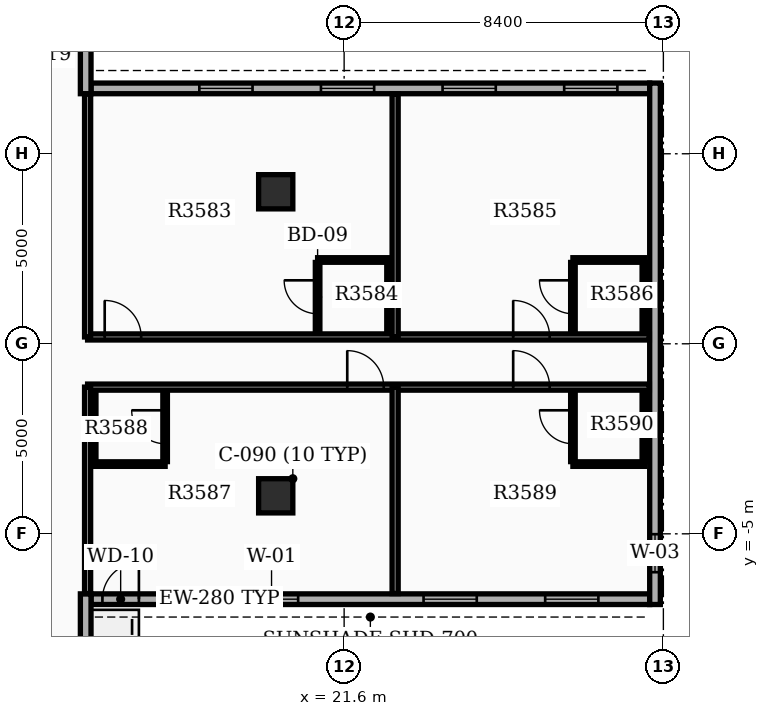
"""IFC4 building model, lengths in metres.
Left out: names, types, materials, properties, quantities, classifications, styles, units other than length and angle.
Written with IfcOpenShell. Run it as: python <this file> out.ifc"""

import sys

from ifc_helpers import new_model, si_unit, direction, frame, frame_2d, origin, origin_2d, place, context, subcontext, project, spatial, rectangle, extrude, element, fill, save


model = new_model("IFC4")
c1 = context("Model", 3, precision=1e-05, world=origin(), true_north=direction((0.0, 1.0)))
c2 = subcontext(c1, "Body", "Model", "MODEL_VIEW")
j1 = project(units=[si_unit("LENGTHUNIT", "METRE"), si_unit("PLANEANGLEUNIT", "RADIAN")], contexts=[c1])
p1 = place(None, origin())
s1 = spatial("IfcSite", under=j1, at=p1, CompositionType="ELEMENT")
p2 = place(p1, origin())
s2 = spatial("IfcBuilding", under=s1, at=p2, CompositionType="ELEMENT")
p3 = place(p2, frame((0.0, 0.0, 224.7)))
s3 = spatial("IfcBuildingStorey", under=s2, at=p3, CompositionType="ELEMENT", Elevation=224.7)
for number, where, z_axis, x_axis in (
    (1, (19.8, -4.0, 0.0), (0.0, 0.0, 1.0), (1.0, 0.0, 0.0)),
    (2, (19.8, 4.0, 0.0), (0.0, 0.0, 1.0), (1.0, 0.0, 0.0)),
):
    element("IfcColumn", number, at=place(p3, frame(where, z_axis=z_axis, x_axis=x_axis)), inside=s3, PredefinedType="COLUMN", context=c2, shape_type="SweptSolid", body=[
        extrude(rectangle(XDim=0.9, YDim=0.9, at=origin_2d()), origin(), (0.0, 0.0, 1.0), 3.9),
    ])
p4 = place(p3, frame((14.94, -6.72, 0.0), z_axis=(0.0, 0.0, 1.0), x_axis=(1.0, 0.0, 0.0)))
e3 = element("IfcWall", 3, at=p4, inside=s3, PredefinedType="STANDARD", context=c2, shape_type="SweptSolid", body=[
    extrude(rectangle(XDim=14.7, YDim=0.28, at=frame_2d((7.35, 0.0))), origin(), (0.0, 0.0, 1.0), 3.18),
])
p5 = place(p4, frame((4.05, 0.0, 0.8)))
e4 = element("IfcOpeningElement", 4, at=p5, cuts=e3, PredefinedType="OPENING", context=c2, shape_type="SweptSolid", body=[
    extrude(rectangle(XDim=1.4, YDim=1.6, at=frame_2d((0.7, 0.8))), frame((0.0, 0.15, 0.0), z_axis=(0.0, -1.0, 0.0), x_axis=(1.0, 0.0, 0.0)), (0.0, 0.0, 1.0), 0.3),
])
p6 = place(p4, frame((8.75, 0.0, 0.8)))
e5 = element("IfcOpeningElement", 5, at=p6, cuts=e3, PredefinedType="OPENING", context=c2, shape_type="SweptSolid", body=[
    extrude(rectangle(XDim=1.4, YDim=1.6, at=frame_2d((0.7, 0.8))), frame((0.0, 0.15, 0.0), z_axis=(0.0, -1.0, 0.0), x_axis=(1.0, 0.0, 0.0)), (0.0, 0.0, 1.0), 0.3),
])
p7 = place(p4, frame((11.95, 0.0, 0.8)))
e6 = element("IfcOpeningElement", 6, at=p7, cuts=e3, PredefinedType="OPENING", context=c2, shape_type="SweptSolid", body=[
    extrude(rectangle(XDim=1.4, YDim=1.6, at=frame_2d((0.7, 0.8))), frame((0.0, 0.15, 0.0), z_axis=(0.0, -1.0, 0.0), x_axis=(1.0, 0.0, 0.0)), (0.0, 0.0, 1.0), 0.3),
])
p8 = place(p4, frame((0.3, 0.0, 0.0)))
e7 = element("IfcOpeningElement", 7, at=p8, cuts=e3, PredefinedType="OPENING", context=c2, shape_type="SweptSolid", body=[
    extrude(rectangle(XDim=0.96, YDim=2.1, at=frame_2d((0.48, 1.05))), frame((0.0, 0.15, 0.0), z_axis=(0.0, -1.0, 0.0), x_axis=(1.0, 0.0, 0.0)), (0.0, 0.0, 1.0), 0.3),
])
p9 = place(p3, frame((29.64, 6.72, 0.0), z_axis=(0.0, 0.0, 1.0), x_axis=(-1.0, 0.0, 0.0)))
e8 = element("IfcWall", 8, at=p9, inside=s3, PredefinedType="STANDARD", context=c2, shape_type="SweptSolid", body=[
    extrude(rectangle(XDim=14.7, YDim=0.28, at=frame_2d((7.35, 0.0))), origin(), (0.0, 0.0, 1.0), 3.18),
])
p10 = place(p9, frame((0.85, 0.0, 0.8)))
e9 = element("IfcOpeningElement", 9, at=p10, cuts=e8, PredefinedType="OPENING", context=c2, shape_type="SweptSolid", body=[
    extrude(rectangle(XDim=1.4, YDim=1.6, at=frame_2d((0.7, 0.8))), frame((0.0, 0.15, 0.0), z_axis=(0.0, -1.0, 0.0), x_axis=(1.0, 0.0, 0.0)), (0.0, 0.0, 1.0), 0.3),
])
p11 = place(p9, frame((4.05, 0.0, 0.8)))
e10 = element("IfcOpeningElement", 10, at=p11, cuts=e8, PredefinedType="OPENING", context=c2, shape_type="SweptSolid", body=[
    extrude(rectangle(XDim=1.4, YDim=1.6, at=frame_2d((0.7, 0.8))), frame((0.0, 0.15, 0.0), z_axis=(0.0, -1.0, 0.0), x_axis=(1.0, 0.0, 0.0)), (0.0, 0.0, 1.0), 0.3),
])
p12 = place(p9, frame((7.25, 0.0, 0.8)))
e11 = element("IfcOpeningElement", 11, at=p12, cuts=e8, PredefinedType="OPENING", context=c2, shape_type="SweptSolid", body=[
    extrude(rectangle(XDim=1.4, YDim=1.6, at=frame_2d((0.7, 0.8))), frame((0.0, 0.15, 0.0), z_axis=(0.0, -1.0, 0.0), x_axis=(1.0, 0.0, 0.0)), (0.0, 0.0, 1.0), 0.3),
])
p13 = place(p9, frame((10.45, 0.0, 0.8)))
e12 = element("IfcOpeningElement", 12, at=p13, cuts=e8, PredefinedType="OPENING", context=c2, shape_type="SweptSolid", body=[
    extrude(rectangle(XDim=1.4, YDim=1.6, at=frame_2d((0.7, 0.8))), frame((0.0, 0.15, 0.0), z_axis=(0.0, -1.0, 0.0), x_axis=(1.0, 0.0, 0.0)), (0.0, 0.0, 1.0), 0.3),
])
p14 = place(p3, frame((29.78, -6.86, 0.0), z_axis=(0.0, 0.0, 1.0), x_axis=(0.0, 1.0, 0.0)))
e13 = element("IfcWall", 13, at=p14, inside=s3, PredefinedType="STANDARD", context=c2, shape_type="SweptSolid", body=[
    extrude(rectangle(XDim=13.72, YDim=0.28, at=frame_2d((6.86, 0.0))), origin(), (0.0, 0.0, 1.0), 3.18),
])
p15 = place(p14, frame((0.85, 0.0, 0.85)))
e14 = element("IfcOpeningElement", 14, at=p15, cuts=e13, PredefinedType="OPENING", context=c2, shape_type="SweptSolid", body=[
    extrude(rectangle(XDim=1.0, YDim=1.5, at=frame_2d((0.5, 0.75))), frame((0.0, 0.15, 0.0), z_axis=(0.0, -1.0, 0.0), x_axis=(1.0, 0.0, 0.0)), (0.0, 0.0, 1.0), 0.3),
])
for number, where, z_axis, x_axis in (
    (15, (14.8, 6.58, 0.0), (0.0, 0.0, 1.0), (0.0, 1.0, 0.0)),
    (16, (14.8, -6.58, 0.0), (0.0, 0.0, 1.0), (0.0, -1.0, 0.0)),
):
    element("IfcWall", number, at=place(p3, frame(where, z_axis=z_axis, x_axis=x_axis)), inside=s3, PredefinedType="STANDARD", context=c2, shape_type="SweptSolid", body=[
        extrude(rectangle(XDim=6.86, YDim=0.28, at=frame_2d((3.43, 0.0))), origin(), (0.0, 0.0, 1.0), 3.18),
    ])
p16 = place(p3, frame((14.85, 0.18, 0.0), z_axis=(0.0, 0.0, 1.0), x_axis=(1.0, 0.0, 0.0)))
e17 = element("IfcWall", 17, at=p16, inside=s3, PredefinedType="PARTITIONING", context=c2, shape_type="SweptSolid", body=[
    extrude(rectangle(XDim=14.782, YDim=0.16, at=frame_2d((7.391, 0.0))), origin(), (0.0, 0.0, 1.0), 3.17),
])
p17 = place(p16, frame((0.45, 0.0, 0.0)))
e18 = element("IfcOpeningElement", 18, at=p17, cuts=e17, PredefinedType="OPENING", context=c2, shape_type="SweptSolid", body=[
    extrude(rectangle(XDim=0.96, YDim=2.15, at=frame_2d((0.48, 1.075))), frame((0.0, 0.09, 0.0), z_axis=(0.0, -1.0, 0.0), x_axis=(1.0, 0.0, 0.0)), (0.0, 0.0, 1.0), 0.18),
])
p18 = place(p16, frame((11.198, 0.0, 0.0)))
e19 = element("IfcOpeningElement", 19, at=p18, cuts=e17, PredefinedType="OPENING", context=c2, shape_type="SweptSolid", body=[
    extrude(rectangle(XDim=0.96, YDim=2.15, at=frame_2d((0.48, 1.075))), frame((0.0, 0.09, 0.0), z_axis=(0.0, -1.0, 0.0), x_axis=(1.0, 0.0, 0.0)), (0.0, 0.0, 1.0), 0.18),
])
for number, where, z_axis, x_axis in (
    (20, (14.85, 0.18, 0.0), (0.0, 0.0, 1.0), (0.0, 1.0, 0.0)),
    (21, (22.942, 0.18, 0.0), (0.0, 0.0, 1.0), (0.0, 1.0, 0.0)),
):
    element("IfcWall", number, at=place(p3, frame(where, z_axis=z_axis, x_axis=x_axis)), inside=s3, PredefinedType="PARTITIONING", context=c2, shape_type="SweptSolid", body=[
        extrude(rectangle(XDim=6.392, YDim=0.16, at=frame_2d((3.196, 0.0))), origin(), (0.0, 0.0, 1.0), 3.17),
    ])
p19 = place(p3, frame((20.902, 0.32, 0.0), z_axis=(0.0, 0.0, 1.0), x_axis=(0.0, 1.0, 0.0)))
e22 = element("IfcWall", 22, at=p19, inside=s3, PredefinedType="PARTITIONING", context=c2, shape_type="SweptSolid", body=[
    extrude(rectangle(XDim=1.82, YDim=0.12, at=frame_2d((0.91, 0.0))), origin(), (0.0, 0.0, 1.0), 3.17),
])
p20 = place(p19, frame((0.47, 0.0, 0.0)))
e23 = element("IfcOpeningElement", 23, at=p20, cuts=e22, PredefinedType="OPENING", context=c2, shape_type="SweptSolid", body=[
    extrude(rectangle(XDim=0.88, YDim=2.1, at=frame_2d((0.44, 1.05))), frame((0.0, 0.07, 0.0), z_axis=(0.0, -1.0, 0.0), x_axis=(1.0, 0.0, 0.0)), (0.0, 0.0, 1.0), 0.14),
])
p21 = place(p3, frame((22.782, 0.32, 0.0), z_axis=(0.0, 0.0, 1.0), x_axis=(0.0, 1.0, 0.0)))
e24 = element("IfcWall", 24, at=p21, inside=s3, PredefinedType="PARTITIONING", context=c2, shape_type="SweptSolid", body=[
    extrude(rectangle(XDim=1.82, YDim=0.12, at=frame_2d((0.91, 0.0))), origin(), (0.0, 0.0, 1.0), 3.17),
])
p22 = place(p3, frame((20.902, 2.205, 0.0), z_axis=(0.0, 0.0, 1.0), x_axis=(1.0, 0.0, 0.0)))
e25 = element("IfcWall", 25, at=p22, inside=s3, PredefinedType="PARTITIONING", context=c2, shape_type="SweptSolid", body=[
    extrude(rectangle(XDim=1.88, YDim=0.12, at=frame_2d((0.94, 0.0))), origin(), (0.0, 0.0, 1.0), 3.17),
])
p23 = place(p3, frame((27.62, 0.32, 0.0), z_axis=(0.0, 0.0, 1.0), x_axis=(0.0, 1.0, 0.0)))
e26 = element("IfcWall", 26, at=p23, inside=s3, PredefinedType="PARTITIONING", context=c2, shape_type="SweptSolid", body=[
    extrude(rectangle(XDim=1.82, YDim=0.12, at=frame_2d((0.91, 0.0))), origin(), (0.0, 0.0, 1.0), 3.17),
])
p24 = place(p23, frame((0.47, 0.0, 0.0)))
e27 = element("IfcOpeningElement", 27, at=p24, cuts=e26, PredefinedType="OPENING", context=c2, shape_type="SweptSolid", body=[
    extrude(rectangle(XDim=0.88, YDim=2.1, at=frame_2d((0.44, 1.05))), frame((0.0, 0.07, 0.0), z_axis=(0.0, -1.0, 0.0), x_axis=(1.0, 0.0, 0.0)), (0.0, 0.0, 1.0), 0.14),
])
p25 = place(p3, frame((29.5, 0.32, 0.0), z_axis=(0.0, 0.0, 1.0), x_axis=(0.0, 1.0, 0.0)))
e28 = element("IfcWall", 28, at=p25, inside=s3, PredefinedType="PARTITIONING", context=c2, shape_type="SweptSolid", body=[
    extrude(rectangle(XDim=1.82, YDim=0.12, at=frame_2d((0.91, 0.0))), origin(), (0.0, 0.0, 1.0), 3.17),
])
p26 = place(p3, frame((27.62, 2.205, 0.0), z_axis=(0.0, 0.0, 1.0), x_axis=(1.0, 0.0, 0.0)))
e29 = element("IfcWall", 29, at=p26, inside=s3, PredefinedType="PARTITIONING", context=c2, shape_type="SweptSolid", body=[
    extrude(rectangle(XDim=1.88, YDim=0.12, at=frame_2d((0.94, 0.0))), origin(), (0.0, 0.0, 1.0), 3.17),
])
p27 = place(p3, frame((14.85, -1.14, 0.0), z_axis=(0.0, 0.0, 1.0), x_axis=(1.0, 0.0, 0.0)))
e30 = element("IfcWall", 30, at=p27, inside=s3, PredefinedType="PARTITIONING", context=c2, shape_type="SweptSolid", body=[
    extrude(rectangle(XDim=14.782, YDim=0.16, at=frame_2d((7.391, 0.0))), origin(), (0.0, 0.0, 1.0), 3.17),
])
p28 = place(p27, frame((6.832, 0.0, 0.0)))
e31 = element("IfcOpeningElement", 31, at=p28, cuts=e30, PredefinedType="OPENING", context=c2, shape_type="SweptSolid", body=[
    extrude(rectangle(XDim=0.96, YDim=2.15, at=frame_2d((0.48, 1.075))), frame((0.0, 0.09, 0.0), z_axis=(0.0, -1.0, 0.0), x_axis=(1.0, 0.0, 0.0)), (0.0, 0.0, 1.0), 0.18),
])
p29 = place(p27, frame((11.198, 0.0, 0.0)))
e32 = element("IfcOpeningElement", 32, at=p29, cuts=e30, PredefinedType="OPENING", context=c2, shape_type="SweptSolid", body=[
    extrude(rectangle(XDim=0.96, YDim=2.15, at=frame_2d((0.48, 1.075))), frame((0.0, 0.09, 0.0), z_axis=(0.0, -1.0, 0.0), x_axis=(1.0, 0.0, 0.0)), (0.0, 0.0, 1.0), 0.18),
])
for number, where, z_axis, x_axis in (
    (33, (14.85, -1.14, 0.0), (0.0, 0.0, 1.0), (0.0, -1.0, 0.0)),
    (34, (22.942, -1.14, 0.0), (0.0, 0.0, 1.0), (0.0, -1.0, 0.0)),
):
    element("IfcWall", number, at=place(p3, frame(where, z_axis=z_axis, x_axis=x_axis)), inside=s3, PredefinedType="PARTITIONING", context=c2, shape_type="SweptSolid", body=[
        extrude(rectangle(XDim=5.432, YDim=0.16, at=frame_2d((2.716, 0.0))), origin(), (0.0, 0.0, 1.0), 3.17),
    ])
p30 = place(p3, frame((16.89, -3.1, 0.0), z_axis=(0.0, 0.0, 1.0), x_axis=(0.0, 1.0, 0.0)))
e35 = element("IfcWall", 35, at=p30, inside=s3, PredefinedType="PARTITIONING", context=c2, shape_type="SweptSolid", body=[
    extrude(rectangle(XDim=1.82, YDim=0.12, at=frame_2d((0.91, 0.0))), origin(), (0.0, 0.0, 1.0), 3.17),
])
p31 = place(p30, frame((0.47, 0.0, 0.0)))
e36 = element("IfcOpeningElement", 36, at=p31, cuts=e35, PredefinedType="OPENING", context=c2, shape_type="SweptSolid", body=[
    extrude(rectangle(XDim=0.88, YDim=2.1, at=frame_2d((0.44, 1.05))), frame((0.0, 0.07, 0.0), z_axis=(0.0, -1.0, 0.0), x_axis=(1.0, 0.0, 0.0)), (0.0, 0.0, 1.0), 0.14),
])
p32 = place(p3, frame((15.01, -3.1, 0.0), z_axis=(0.0, 0.0, 1.0), x_axis=(0.0, 1.0, 0.0)))
e37 = element("IfcWall", 37, at=p32, inside=s3, PredefinedType="PARTITIONING", context=c2, shape_type="SweptSolid", body=[
    extrude(rectangle(XDim=1.82, YDim=0.12, at=frame_2d((0.91, 0.0))), origin(), (0.0, 0.0, 1.0), 3.17),
])
p33 = place(p3, frame((15.01, -3.165, 0.0), z_axis=(0.0, 0.0, 1.0), x_axis=(1.0, 0.0, 0.0)))
e38 = element("IfcWall", 38, at=p33, inside=s3, PredefinedType="PARTITIONING", context=c2, shape_type="SweptSolid", body=[
    extrude(rectangle(XDim=1.88, YDim=0.12, at=frame_2d((0.94, 0.0))), origin(), (0.0, 0.0, 1.0), 3.17),
])
p34 = place(p3, frame((27.62, -3.1, 0.0), z_axis=(0.0, 0.0, 1.0), x_axis=(0.0, 1.0, 0.0)))
e39 = element("IfcWall", 39, at=p34, inside=s3, PredefinedType="PARTITIONING", context=c2, shape_type="SweptSolid", body=[
    extrude(rectangle(XDim=1.82, YDim=0.12, at=frame_2d((0.91, 0.0))), origin(), (0.0, 0.0, 1.0), 3.17),
])
p35 = place(p34, frame((0.47, 0.0, 0.0)))
e40 = element("IfcOpeningElement", 40, at=p35, cuts=e39, PredefinedType="OPENING", context=c2, shape_type="SweptSolid", body=[
    extrude(rectangle(XDim=0.88, YDim=2.1, at=frame_2d((0.44, 1.05))), frame((0.0, 0.07, 0.0), z_axis=(0.0, -1.0, 0.0), x_axis=(1.0, 0.0, 0.0)), (0.0, 0.0, 1.0), 0.14),
])
p36 = place(p3, frame((29.5, -3.1, 0.0), z_axis=(0.0, 0.0, 1.0), x_axis=(0.0, 1.0, 0.0)))
e41 = element("IfcWall", 41, at=p36, inside=s3, PredefinedType="PARTITIONING", context=c2, shape_type="SweptSolid", body=[
    extrude(rectangle(XDim=1.82, YDim=0.12, at=frame_2d((0.91, 0.0))), origin(), (0.0, 0.0, 1.0), 3.17),
])
p37 = place(p3, frame((27.62, -3.165, 0.0), z_axis=(0.0, 0.0, 1.0), x_axis=(1.0, 0.0, 0.0)))
e42 = element("IfcWall", 42, at=p37, inside=s3, PredefinedType="PARTITIONING", context=c2, shape_type="SweptSolid", body=[
    extrude(rectangle(XDim=1.88, YDim=0.12, at=frame_2d((0.94, 0.0))), origin(), (0.0, 0.0, 1.0), 3.17),
])
p38 = place(p5, origin())
e43 = element("IfcWindow", 43, at=p38, inside=s3, PartitioningType="SINGLE_PANEL", PredefinedType="WINDOW", context=c2, shape_type="SweptSolid", body=[
    extrude(rectangle(XDim=1.4, YDim=1.6, at=frame_2d((0.7, 0.8))), frame((0.0, 0.03, 0.0), z_axis=(0.0, -1.0, 0.0), x_axis=(1.0, 0.0, 0.0)), (0.0, 0.0, 1.0), 0.06),
])
fill(e4, e43)
p39 = place(p6, origin())
e44 = element("IfcWindow", 44, at=p39, inside=s3, PartitioningType="SINGLE_PANEL", PredefinedType="WINDOW", context=c2, shape_type="SweptSolid", body=[
    extrude(rectangle(XDim=1.4, YDim=1.6, at=frame_2d((0.7, 0.8))), frame((0.0, 0.03, 0.0), z_axis=(0.0, -1.0, 0.0), x_axis=(1.0, 0.0, 0.0)), (0.0, 0.0, 1.0), 0.06),
])
fill(e5, e44)
p40 = place(p7, origin())
e45 = element("IfcWindow", 45, at=p40, inside=s3, PartitioningType="SINGLE_PANEL", PredefinedType="WINDOW", context=c2, shape_type="SweptSolid", body=[
    extrude(rectangle(XDim=1.4, YDim=1.6, at=frame_2d((0.7, 0.8))), frame((0.0, 0.03, 0.0), z_axis=(0.0, -1.0, 0.0), x_axis=(1.0, 0.0, 0.0)), (0.0, 0.0, 1.0), 0.06),
])
fill(e6, e45)
p41 = place(p10, origin())
e46 = element("IfcWindow", 46, at=p41, inside=s3, PartitioningType="SINGLE_PANEL", PredefinedType="WINDOW", context=c2, shape_type="SweptSolid", body=[
    extrude(rectangle(XDim=1.4, YDim=1.6, at=frame_2d((0.7, 0.8))), frame((0.0, 0.03, 0.0), z_axis=(0.0, -1.0, 0.0), x_axis=(1.0, 0.0, 0.0)), (0.0, 0.0, 1.0), 0.06),
])
fill(e9, e46)
p42 = place(p11, origin())
e47 = element("IfcWindow", 47, at=p42, inside=s3, PartitioningType="SINGLE_PANEL", PredefinedType="WINDOW", context=c2, shape_type="SweptSolid", body=[
    extrude(rectangle(XDim=1.4, YDim=1.6, at=frame_2d((0.7, 0.8))), frame((0.0, 0.03, 0.0), z_axis=(0.0, -1.0, 0.0), x_axis=(1.0, 0.0, 0.0)), (0.0, 0.0, 1.0), 0.06),
])
fill(e10, e47)
p43 = place(p12, origin())
e48 = element("IfcWindow", 48, at=p43, inside=s3, PartitioningType="SINGLE_PANEL", PredefinedType="WINDOW", context=c2, shape_type="SweptSolid", body=[
    extrude(rectangle(XDim=1.4, YDim=1.6, at=frame_2d((0.7, 0.8))), frame((0.0, 0.03, 0.0), z_axis=(0.0, -1.0, 0.0), x_axis=(1.0, 0.0, 0.0)), (0.0, 0.0, 1.0), 0.06),
])
fill(e11, e48)
p44 = place(p13, origin())
e49 = element("IfcWindow", 49, at=p44, inside=s3, PartitioningType="SINGLE_PANEL", PredefinedType="WINDOW", context=c2, shape_type="SweptSolid", body=[
    extrude(rectangle(XDim=1.4, YDim=1.6, at=frame_2d((0.7, 0.8))), frame((0.0, 0.03, 0.0), z_axis=(0.0, -1.0, 0.0), x_axis=(1.0, 0.0, 0.0)), (0.0, 0.0, 1.0), 0.06),
])
fill(e12, e49)
p45 = place(p15, origin())
e50 = element("IfcWindow", 50, at=p45, inside=s3, PartitioningType="SINGLE_PANEL", PredefinedType="WINDOW", context=c2, shape_type="SweptSolid", body=[
    extrude(rectangle(XDim=1.0, YDim=1.5, at=frame_2d((0.5, 0.75))), frame((0.0, 0.03, 0.0), z_axis=(0.0, -1.0, 0.0), x_axis=(1.0, 0.0, 0.0)), (0.0, 0.0, 1.0), 0.06),
])
fill(e14, e50)
p46 = place(p8, origin())
e51 = element("IfcDoor", 51, at=p46, inside=s3, OperationType="SINGLE_SWING_RIGHT", PredefinedType="DOOR", context=c2, shape_type="SweptSolid", body=[
    extrude(rectangle(XDim=0.96, YDim=2.1, at=frame_2d((0.48, 1.05))), frame((0.0, 0.025, 0.0), z_axis=(0.0, -1.0, 0.0), x_axis=(1.0, 0.0, 0.0)), (0.0, 0.0, 1.0), 0.05),
])
fill(e7, e51)
p47 = place(p17, origin())
e52 = element("IfcDoor", 52, at=p47, inside=s3, OperationType="SINGLE_SWING_LEFT", PredefinedType="DOOR", context=c2, shape_type="SweptSolid", body=[
    extrude(rectangle(XDim=0.96, YDim=2.15, at=frame_2d((0.48, 1.075))), frame((0.0, 0.025, 0.0), z_axis=(0.0, -1.0, 0.0), x_axis=(1.0, 0.0, 0.0)), (0.0, 0.0, 1.0), 0.05),
])
fill(e18, e52)
p48 = place(p20, origin())
e53 = element("IfcDoor", 53, at=p48, inside=s3, OperationType="SINGLE_SWING_RIGHT", PredefinedType="DOOR", context=c2, shape_type="SweptSolid", body=[
    extrude(rectangle(XDim=0.88, YDim=2.1, at=frame_2d((0.44, 1.05))), frame((0.0, 0.025, 0.0), z_axis=(0.0, -1.0, 0.0), x_axis=(1.0, 0.0, 0.0)), (0.0, 0.0, 1.0), 0.05),
])
fill(e23, e53)
p49 = place(p18, origin())
e54 = element("IfcDoor", 54, at=p49, inside=s3, OperationType="SINGLE_SWING_LEFT", PredefinedType="DOOR", context=c2, shape_type="SweptSolid", body=[
    extrude(rectangle(XDim=0.96, YDim=2.15, at=frame_2d((0.48, 1.075))), frame((0.0, 0.025, 0.0), z_axis=(0.0, -1.0, 0.0), x_axis=(1.0, 0.0, 0.0)), (0.0, 0.0, 1.0), 0.05),
])
fill(e19, e54)
p50 = place(p24, origin())
e55 = element("IfcDoor", 55, at=p50, inside=s3, OperationType="SINGLE_SWING_RIGHT", PredefinedType="DOOR", context=c2, shape_type="SweptSolid", body=[
    extrude(rectangle(XDim=0.88, YDim=2.1, at=frame_2d((0.44, 1.05))), frame((0.0, 0.025, 0.0), z_axis=(0.0, -1.0, 0.0), x_axis=(1.0, 0.0, 0.0)), (0.0, 0.0, 1.0), 0.05),
])
fill(e27, e55)
p51 = place(p28, origin())
e56 = element("IfcDoor", 56, at=p51, inside=s3, OperationType="SINGLE_SWING_LEFT", PredefinedType="DOOR", context=c2, shape_type="SweptSolid", body=[
    extrude(rectangle(XDim=0.96, YDim=2.15, at=frame_2d((0.48, 1.075))), frame((0.0, 0.025, 0.0), z_axis=(0.0, -1.0, 0.0), x_axis=(1.0, 0.0, 0.0)), (0.0, 0.0, 1.0), 0.05),
])
fill(e31, e56)
p52 = place(p31, origin())
e57 = element("IfcDoor", 57, at=p52, inside=s3, OperationType="SINGLE_SWING_RIGHT", PredefinedType="DOOR", context=c2, shape_type="SweptSolid", body=[
    extrude(rectangle(XDim=0.88, YDim=2.1, at=frame_2d((0.44, 1.05))), frame((0.0, 0.025, 0.0), z_axis=(0.0, -1.0, 0.0), x_axis=(1.0, 0.0, 0.0)), (0.0, 0.0, 1.0), 0.05),
])
fill(e36, e57)
p53 = place(p29, origin())
e58 = element("IfcDoor", 58, at=p53, inside=s3, OperationType="SINGLE_SWING_LEFT", PredefinedType="DOOR", context=c2, shape_type="SweptSolid", body=[
    extrude(rectangle(XDim=0.96, YDim=2.15, at=frame_2d((0.48, 1.075))), frame((0.0, 0.025, 0.0), z_axis=(0.0, -1.0, 0.0), x_axis=(1.0, 0.0, 0.0)), (0.0, 0.0, 1.0), 0.05),
])
fill(e32, e58)
p54 = place(p35, origin())
e59 = element("IfcDoor", 59, at=p54, inside=s3, OperationType="SINGLE_SWING_RIGHT", PredefinedType="DOOR", context=c2, shape_type="SweptSolid", body=[
    extrude(rectangle(XDim=0.88, YDim=2.1, at=frame_2d((0.44, 1.05))), frame((0.0, 0.025, 0.0), z_axis=(0.0, -1.0, 0.0), x_axis=(1.0, 0.0, 0.0)), (0.0, 0.0, 1.0), 0.05),
])
fill(e40, e59)
save(model, sys.argv[1])
